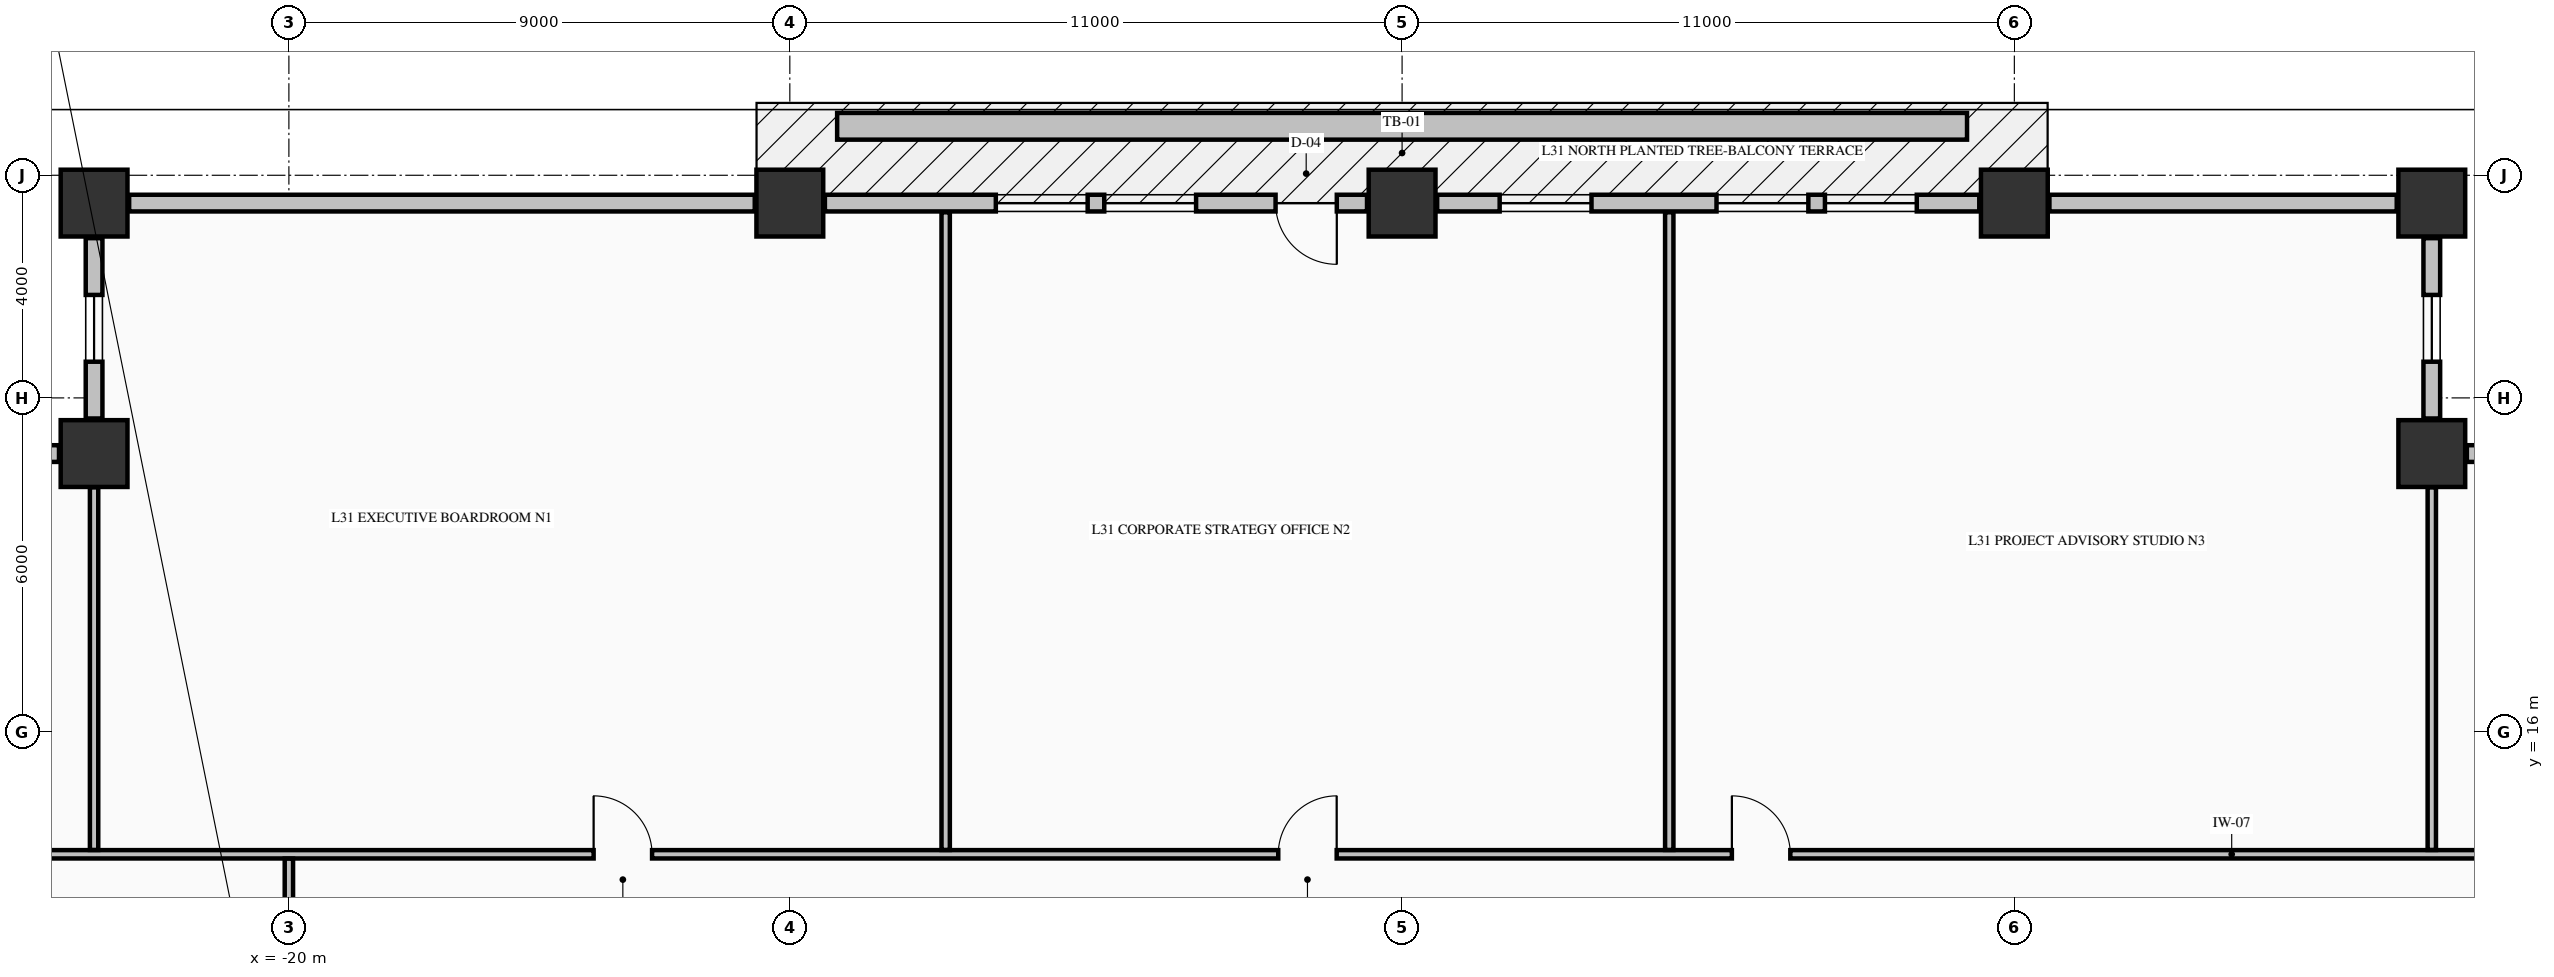
"""IFC4 building model, lengths in metres.
Left out: names, types, materials, properties, quantities, classifications, styles, units other than length and angle.
Written with IfcOpenShell. Run it as: python <this file> out.ifc"""

import sys

from ifc_helpers import new_model, si_unit, direction, frame, frame_2d, origin, origin_2d, place, context, subcontext, project, spatial, rectangle, extrude, element, fill, save


model = new_model("IFC4")
c1 = context("Model", 3, precision=1e-05, world=origin(), true_north=direction((0.0, 1.0)))
c2 = subcontext(c1, "Body", "Model", "MODEL_VIEW")
j1 = project(units=[si_unit("LENGTHUNIT", "METRE"), si_unit("PLANEANGLEUNIT", "RADIAN")], contexts=[c1])
p1 = place(None, origin())
s1 = spatial("IfcSite", under=j1, at=p1, CompositionType="ELEMENT")
p2 = place(p1, origin())
s2 = spatial("IfcBuilding", under=s1, at=p2, CompositionType="ELEMENT")
p3 = place(p2, frame((0.0, 0.0, 124.92)))
s3 = spatial("IfcBuildingStorey", under=s2, at=p3, CompositionType="ELEMENT", Elevation=124.92)
for number, where, z_axis, x_axis in (
    (1, (-23.5, 25.5, -0.25), (0.0, 0.0, 1.0), (1.0, 0.0, 0.0)),
    (2, (-11.0, 25.5, -0.25), (0.0, 0.0, 1.0), (1.0, 0.0, 0.0)),
    (3, (0.0, 25.5, -0.25), (0.0, 0.0, 1.0), (1.0, 0.0, 0.0)),
    (4, (11.0, 25.5, -0.25), (0.0, 0.0, 1.0), (1.0, 0.0, 0.0)),
    (5, (18.5, 25.5, -0.25), (0.0, 0.0, 1.0), (1.0, 0.0, 0.0)),
    (6, (18.5, 21.0, -0.25), (0.0, 0.0, 1.0), (1.0, 0.0, 0.0)),
    (7, (-23.5, 21.0, -0.25), (0.0, 0.0, 1.0), (1.0, 0.0, 0.0)),
):
    element("IfcColumn", number, at=place(p3, frame(where, z_axis=z_axis, x_axis=x_axis)), inside=s3, PredefinedType="COLUMN", context=c2, shape_type="SweptSolid", body=[
        extrude(rectangle(XDim=1.2, YDim=1.2, at=origin_2d()), origin(), (0.0, 0.0, 1.0), 3.57),
    ])
p4 = place(p3, frame((22.37, 21.0, 0.0), z_axis=(0.0, 0.0, 1.0), x_axis=(-1.0, 0.0, 0.0)))
e8 = element("IfcWall", 8, at=p4, inside=s3, PredefinedType="STANDARD", context=c2, shape_type="SweptSolid", body=[
    extrude(rectangle(XDim=3.24, YDim=0.3, at=frame_2d((1.62, 0.0))), origin(), (0.0, 0.0, 1.0), 2.712),
])
p5 = place(p4, frame((1.02, 0.0, 0.82)))
e9 = element("IfcOpeningElement", 9, at=p5, cuts=e8, PredefinedType="OPENING", context=c2, shape_type="SweptSolid", body=[
    extrude(rectangle(XDim=1.2, YDim=1.65, at=frame_2d((0.6, 0.825))), frame((0.0, 0.16, 0.0), z_axis=(0.0, -1.0, 0.0), x_axis=(1.0, 0.0, 0.0)), (0.0, 0.0, 1.0), 0.32),
])
p6 = place(p3, frame((18.5, 21.63, 0.0), z_axis=(0.0, 0.0, 1.0), x_axis=(0.0, 1.0, 0.0)))
e10 = element("IfcWall", 10, at=p6, inside=s3, PredefinedType="STANDARD", context=c2, shape_type="SweptSolid", body=[
    extrude(rectangle(XDim=3.24, YDim=0.3, at=frame_2d((1.62, 0.0))), origin(), (0.0, 0.0, 1.0), 2.712),
])
p7 = place(p6, frame((1.02, 0.0, 0.82)))
e11 = element("IfcOpeningElement", 11, at=p7, cuts=e10, PredefinedType="OPENING", context=c2, shape_type="SweptSolid", body=[
    extrude(rectangle(XDim=1.2, YDim=1.65, at=frame_2d((0.6, 0.825))), frame((0.0, 0.16, 0.0), z_axis=(0.0, -1.0, 0.0), x_axis=(1.0, 0.0, 0.0)), (0.0, 0.0, 1.0), 0.32),
])
p8 = place(p3, frame((-23.5, 24.87, 0.0), z_axis=(0.0, 0.0, 1.0), x_axis=(0.0, -1.0, 0.0)))
e12 = element("IfcWall", 12, at=p8, inside=s3, PredefinedType="STANDARD", context=c2, shape_type="SweptSolid", body=[
    extrude(rectangle(XDim=3.24, YDim=0.3, at=frame_2d((1.62, 0.0))), origin(), (0.0, 0.0, 1.0), 2.712),
])
p9 = place(p8, frame((1.02, 0.0, 0.82)))
e13 = element("IfcOpeningElement", 13, at=p9, cuts=e12, PredefinedType="OPENING", context=c2, shape_type="SweptSolid", body=[
    extrude(rectangle(XDim=1.2, YDim=1.65, at=frame_2d((0.6, 0.825))), frame((0.0, 0.16, 0.0), z_axis=(0.0, -1.0, 0.0), x_axis=(1.0, 0.0, 0.0)), (0.0, 0.0, 1.0), 0.32),
])
p10 = place(p3, frame((-24.13, 21.0, 0.0), z_axis=(0.0, 0.0, 1.0), x_axis=(-1.0, 0.0, 0.0)))
e14 = element("IfcWall", 14, at=p10, inside=s3, PredefinedType="STANDARD", context=c2, shape_type="SweptSolid", body=[
    extrude(rectangle(XDim=3.24, YDim=0.3, at=frame_2d((1.62, 0.0))), origin(), (0.0, 0.0, 1.0), 2.712),
])
p11 = place(p10, frame((1.02, 0.0, 0.82)))
e15 = element("IfcOpeningElement", 15, at=p11, cuts=e14, PredefinedType="OPENING", context=c2, shape_type="SweptSolid", body=[
    extrude(rectangle(XDim=1.2, YDim=1.65, at=frame_2d((0.6, 0.825))), frame((0.0, 0.16, 0.0), z_axis=(0.0, -1.0, 0.0), x_axis=(1.0, 0.0, 0.0)), (0.0, 0.0, 1.0), 0.32),
])
p12 = place(p3, frame((-11.63, 25.5, 0.0), z_axis=(0.0, 0.0, 1.0), x_axis=(-1.0, 0.0, 0.0)))
e16 = element("IfcWall", 16, at=p12, inside=s3, PredefinedType="STANDARD", context=c2, shape_type="SweptSolid", body=[
    extrude(rectangle(XDim=11.24, YDim=0.3, at=frame_2d((5.62, 0.0))), origin(), (0.0, 0.0, 1.0), 2.712),
])
p13 = place(p3, frame((-0.63, 25.5, 0.0), z_axis=(0.0, 0.0, 1.0), x_axis=(-1.0, 0.0, 0.0)))
e17 = element("IfcWall", 17, at=p13, inside=s3, PredefinedType="STANDARD", context=c2, shape_type="SweptSolid", body=[
    extrude(rectangle(XDim=9.74, YDim=0.3, at=frame_2d((4.87, 0.0))), origin(), (0.0, 0.0, 1.0), 2.712),
])
p14 = place(p13, frame((0.543, 0.0, 0.0)))
e18 = element("IfcOpeningElement", 18, at=p14, cuts=e17, PredefinedType="OPENING", context=c2, shape_type="SweptSolid", body=[
    extrude(rectangle(XDim=1.1, YDim=2.15, at=frame_2d((0.55, 1.075))), frame((0.0, 0.16, 0.0), z_axis=(0.0, -1.0, 0.0), x_axis=(1.0, 0.0, 0.0)), (0.0, 0.0, 1.0), 0.32),
])
p15 = place(p13, frame((3.071, 0.0, 0.8)))
e19 = element("IfcOpeningElement", 19, at=p15, cuts=e17, PredefinedType="OPENING", context=c2, shape_type="SweptSolid", body=[
    extrude(rectangle(XDim=1.65, YDim=1.7, at=frame_2d((0.825, 0.85))), frame((0.0, 0.16, 0.0), z_axis=(0.0, -1.0, 0.0), x_axis=(1.0, 0.0, 0.0)), (0.0, 0.0, 1.0), 0.32),
])
p16 = place(p13, frame((5.019, 0.0, 0.8)))
e20 = element("IfcOpeningElement", 20, at=p16, cuts=e17, PredefinedType="OPENING", context=c2, shape_type="SweptSolid", body=[
    extrude(rectangle(XDim=1.65, YDim=1.7, at=frame_2d((0.825, 0.85))), frame((0.0, 0.16, 0.0), z_axis=(0.0, -1.0, 0.0), x_axis=(1.0, 0.0, 0.0)), (0.0, 0.0, 1.0), 0.32),
])
p17 = place(p3, frame((10.37, 25.5, 0.0), z_axis=(0.0, 0.0, 1.0), x_axis=(-1.0, 0.0, 0.0)))
e21 = element("IfcWall", 21, at=p17, inside=s3, PredefinedType="STANDARD", context=c2, shape_type="SweptSolid", body=[
    extrude(rectangle(XDim=9.74, YDim=0.3, at=frame_2d((4.87, 0.0))), origin(), (0.0, 0.0, 1.0), 2.712),
])
p18 = place(p17, frame((1.123, 0.0, 0.8)))
e22 = element("IfcOpeningElement", 22, at=p18, cuts=e21, PredefinedType="OPENING", context=c2, shape_type="SweptSolid", body=[
    extrude(rectangle(XDim=1.65, YDim=1.7, at=frame_2d((0.825, 0.85))), frame((0.0, 0.16, 0.0), z_axis=(0.0, -1.0, 0.0), x_axis=(1.0, 0.0, 0.0)), (0.0, 0.0, 1.0), 0.32),
])
p19 = place(p17, frame((3.071, 0.0, 0.8)))
e23 = element("IfcOpeningElement", 23, at=p19, cuts=e21, PredefinedType="OPENING", context=c2, shape_type="SweptSolid", body=[
    extrude(rectangle(XDim=1.65, YDim=1.7, at=frame_2d((0.825, 0.85))), frame((0.0, 0.16, 0.0), z_axis=(0.0, -1.0, 0.0), x_axis=(1.0, 0.0, 0.0)), (0.0, 0.0, 1.0), 0.32),
])
p20 = place(p17, frame((6.967, 0.0, 0.8)))
e24 = element("IfcOpeningElement", 24, at=p20, cuts=e21, PredefinedType="OPENING", context=c2, shape_type="SweptSolid", body=[
    extrude(rectangle(XDim=1.65, YDim=1.7, at=frame_2d((0.825, 0.85))), frame((0.0, 0.16, 0.0), z_axis=(0.0, -1.0, 0.0), x_axis=(1.0, 0.0, 0.0)), (0.0, 0.0, 1.0), 0.32),
])
p21 = place(p3, frame((17.87, 25.5, 0.0), z_axis=(0.0, 0.0, 1.0), x_axis=(-1.0, 0.0, 0.0)))
e25 = element("IfcWall", 25, at=p21, inside=s3, PredefinedType="STANDARD", context=c2, shape_type="SweptSolid", body=[
    extrude(rectangle(XDim=6.24, YDim=0.3, at=frame_2d((3.12, 0.0))), origin(), (0.0, 0.0, 1.0), 2.712),
])
p22 = place(p3, frame((-27.835, 13.8, 0.0), z_axis=(0.0, 0.0, 1.0), x_axis=(1.0, 0.0, 0.0)))
e26 = element("IfcWall", 26, at=p22, inside=s3, PredefinedType="PARTITIONING", context=c2, shape_type="SweptSolid", body=[
    extrude(rectangle(XDim=50.67, YDim=0.15, at=frame_2d((25.335, 0.0))), origin(), (0.0, 0.0, 1.0), 3.32),
])
p23 = place(p22, frame((13.31, 0.0, 0.0)))
e27 = element("IfcOpeningElement", 27, at=p23, cuts=e26, PredefinedType="OPENING", context=c2, shape_type="SweptSolid", body=[
    extrude(rectangle(XDim=1.05, YDim=2.15, at=frame_2d((0.525, 1.075))), frame((0.0, 0.085, 0.0), z_axis=(0.0, -1.0, 0.0), x_axis=(1.0, 0.0, 0.0)), (0.0, 0.0, 1.0), 0.17),
])
p24 = place(p22, frame((25.61, 0.0, 0.0)))
e28 = element("IfcOpeningElement", 28, at=p24, cuts=e26, PredefinedType="OPENING", context=c2, shape_type="SweptSolid", body=[
    extrude(rectangle(XDim=1.05, YDim=2.15, at=frame_2d((0.525, 1.075))), frame((0.0, 0.085, 0.0), z_axis=(0.0, -1.0, 0.0), x_axis=(1.0, 0.0, 0.0)), (0.0, 0.0, 1.0), 0.17),
])
p25 = place(p22, frame((33.76, 0.0, 0.0)))
e29 = element("IfcOpeningElement", 29, at=p25, cuts=e26, PredefinedType="OPENING", context=c2, shape_type="SweptSolid", body=[
    extrude(rectangle(XDim=1.05, YDim=2.15, at=frame_2d((0.525, 1.075))), frame((0.0, 0.085, 0.0), z_axis=(0.0, -1.0, 0.0), x_axis=(1.0, 0.0, 0.0)), (0.0, 0.0, 1.0), 0.17),
])
p26 = place(p3, frame((-23.5, 13.878, 0.0), z_axis=(0.0, 0.0, 1.0), x_axis=(0.0, 1.0, 0.0)))
e30 = element("IfcWall", 30, at=p26, inside=s3, PredefinedType="PARTITIONING", context=c2, shape_type="SweptSolid", body=[
    extrude(rectangle(XDim=6.516, YDim=0.15, at=frame_2d((3.258, 0.0))), origin(), (0.0, 0.0, 1.0), 3.32),
])
p27 = place(p3, frame((-20.0, 11.006, 0.0), z_axis=(0.0, 0.0, 1.0), x_axis=(0.0, 1.0, 0.0)))
e31 = element("IfcWall", 31, at=p27, inside=s3, PredefinedType="PARTITIONING", context=c2, shape_type="SweptSolid", body=[
    extrude(rectangle(XDim=2.716, YDim=0.15, at=frame_2d((1.358, 0.0))), origin(), (0.0, 0.0, 1.0), 2.81),
])
p28 = place(p27, frame((0.669, 0.0, 0.0)))
e32 = element("IfcOpeningElement", 32, at=p28, cuts=e31, PredefinedType="OPENING", context=c2, shape_type="SweptSolid", body=[
    extrude(rectangle(XDim=0.95, YDim=2.15, at=frame_2d((0.475, 1.075))), frame((0.0, 0.085, 0.0), z_axis=(0.0, -1.0, 0.0), x_axis=(1.0, 0.0, 0.0)), (0.0, 0.0, 1.0), 0.17),
])
for number, where, z_axis, x_axis in (
    (33, (-8.2, 13.878, 0.0), (0.0, 0.0, 1.0), (0.0, 1.0, 0.0)),
    (34, (4.8, 13.878, 0.0), (0.0, 0.0, 1.0), (0.0, 1.0, 0.0)),
):
    element("IfcWall", number, at=place(p3, frame(where, z_axis=z_axis, x_axis=x_axis)), inside=s3, PredefinedType="PARTITIONING", context=c2, shape_type="SweptSolid", body=[
        extrude(rectangle(XDim=11.457, YDim=0.15, at=frame_2d((5.729, 0.0))), origin(), (0.0, 0.0, 1.0), 3.32),
    ])
p29 = place(p3, frame((18.5, 13.878, 0.0), z_axis=(0.0, 0.0, 1.0), x_axis=(0.0, 1.0, 0.0)))
e35 = element("IfcWall", 35, at=p29, inside=s3, PredefinedType="PARTITIONING", context=c2, shape_type="SweptSolid", body=[
    extrude(rectangle(XDim=6.516, YDim=0.15, at=frame_2d((3.258, 0.0))), origin(), (0.0, 0.0, 1.0), 3.32),
])
p30 = place(p3, frame((-10.15, 26.88, -0.04), z_axis=(0.0, 0.0, 1.0), x_axis=(1.0, 0.0, 0.0)))
e36 = element("IfcWall", 36, at=p30, inside=s3, PredefinedType="PARAPET", context=c2, shape_type="SweptSolid", body=[
    extrude(rectangle(XDim=20.3, YDim=0.48, at=frame_2d((10.15, 0.0))), origin(), (0.0, 0.0, 1.0), 0.52),
])
p31 = place(p7, origin())
e37 = element("IfcWindow", 37, at=p31, inside=s3, PartitioningType="SINGLE_PANEL", PredefinedType="WINDOW", context=c2, shape_type="SweptSolid", body=[
    extrude(rectangle(XDim=1.2, YDim=1.65, at=frame_2d((0.6, 0.825))), frame((0.0, 0.03, 0.0), z_axis=(0.0, -1.0, 0.0), x_axis=(1.0, 0.0, 0.0)), (0.0, 0.0, 1.0), 0.06),
])
fill(e11, e37)
p32 = place(p9, origin())
e38 = element("IfcWindow", 38, at=p32, inside=s3, PartitioningType="SINGLE_PANEL", PredefinedType="WINDOW", context=c2, shape_type="SweptSolid", body=[
    extrude(rectangle(XDim=1.2, YDim=1.65, at=frame_2d((0.6, 0.825))), frame((0.0, 0.03, 0.0), z_axis=(0.0, -1.0, 0.0), x_axis=(1.0, 0.0, 0.0)), (0.0, 0.0, 1.0), 0.06),
])
fill(e13, e38)
p33 = place(p14, origin())
e39 = element("IfcDoor", 39, at=p33, inside=s3, OperationType="SINGLE_SWING_LEFT", PredefinedType="DOOR", context=c2, shape_type="SweptSolid", body=[
    extrude(rectangle(XDim=1.1, YDim=2.15, at=frame_2d((0.55, 1.075))), frame((0.0, 0.025, 0.0), z_axis=(0.0, -1.0, 0.0), x_axis=(1.0, 0.0, 0.0)), (0.0, 0.0, 1.0), 0.05),
])
fill(e18, e39)
p34 = place(p15, origin())
e40 = element("IfcWindow", 40, at=p34, inside=s3, PartitioningType="SINGLE_PANEL", PredefinedType="WINDOW", context=c2, shape_type="SweptSolid", body=[
    extrude(rectangle(XDim=1.65, YDim=1.7, at=frame_2d((0.825, 0.85))), frame((0.0, 0.03, 0.0), z_axis=(0.0, -1.0, 0.0), x_axis=(1.0, 0.0, 0.0)), (0.0, 0.0, 1.0), 0.06),
])
fill(e19, e40)
p35 = place(p16, origin())
e41 = element("IfcWindow", 41, at=p35, inside=s3, PartitioningType="SINGLE_PANEL", PredefinedType="WINDOW", context=c2, shape_type="SweptSolid", body=[
    extrude(rectangle(XDim=1.65, YDim=1.7, at=frame_2d((0.825, 0.85))), frame((0.0, 0.03, 0.0), z_axis=(0.0, -1.0, 0.0), x_axis=(1.0, 0.0, 0.0)), (0.0, 0.0, 1.0), 0.06),
])
fill(e20, e41)
p36 = place(p18, origin())
e42 = element("IfcWindow", 42, at=p36, inside=s3, PartitioningType="SINGLE_PANEL", PredefinedType="WINDOW", context=c2, shape_type="SweptSolid", body=[
    extrude(rectangle(XDim=1.65, YDim=1.7, at=frame_2d((0.825, 0.85))), frame((0.0, 0.03, 0.0), z_axis=(0.0, -1.0, 0.0), x_axis=(1.0, 0.0, 0.0)), (0.0, 0.0, 1.0), 0.06),
])
fill(e22, e42)
p37 = place(p19, origin())
e43 = element("IfcWindow", 43, at=p37, inside=s3, PartitioningType="SINGLE_PANEL", PredefinedType="WINDOW", context=c2, shape_type="SweptSolid", body=[
    extrude(rectangle(XDim=1.65, YDim=1.7, at=frame_2d((0.825, 0.85))), frame((0.0, 0.03, 0.0), z_axis=(0.0, -1.0, 0.0), x_axis=(1.0, 0.0, 0.0)), (0.0, 0.0, 1.0), 0.06),
])
fill(e23, e43)
p38 = place(p20, origin())
e44 = element("IfcWindow", 44, at=p38, inside=s3, PartitioningType="SINGLE_PANEL", PredefinedType="WINDOW", context=c2, shape_type="SweptSolid", body=[
    extrude(rectangle(XDim=1.65, YDim=1.7, at=frame_2d((0.825, 0.85))), frame((0.0, 0.03, 0.0), z_axis=(0.0, -1.0, 0.0), x_axis=(1.0, 0.0, 0.0)), (0.0, 0.0, 1.0), 0.06),
])
fill(e24, e44)
p39 = place(p23, origin())
e45 = element("IfcDoor", 45, at=p39, inside=s3, OperationType="SINGLE_SWING_LEFT", PredefinedType="DOOR", context=c2, shape_type="SweptSolid", body=[
    extrude(rectangle(XDim=1.05, YDim=2.15, at=frame_2d((0.525, 1.075))), frame((0.0, 0.025, 0.0), z_axis=(0.0, -1.0, 0.0), x_axis=(1.0, 0.0, 0.0)), (0.0, 0.0, 1.0), 0.05),
])
fill(e27, e45)
p40 = place(p24, origin())
e46 = element("IfcDoor", 46, at=p40, inside=s3, OperationType="SINGLE_SWING_RIGHT", PredefinedType="DOOR", context=c2, shape_type="SweptSolid", body=[
    extrude(rectangle(XDim=1.05, YDim=2.15, at=frame_2d((0.525, 1.075))), frame((0.0, 0.025, 0.0), z_axis=(0.0, -1.0, 0.0), x_axis=(1.0, 0.0, 0.0)), (0.0, 0.0, 1.0), 0.05),
])
fill(e28, e46)
p41 = place(p25, origin())
e47 = element("IfcDoor", 47, at=p41, inside=s3, OperationType="SINGLE_SWING_LEFT", PredefinedType="DOOR", context=c2, shape_type="SweptSolid", body=[
    extrude(rectangle(XDim=1.05, YDim=2.15, at=frame_2d((0.525, 1.075))), frame((0.0, 0.025, 0.0), z_axis=(0.0, -1.0, 0.0), x_axis=(1.0, 0.0, 0.0)), (0.0, 0.0, 1.0), 0.05),
])
fill(e29, e47)
save(model, sys.argv[1])
